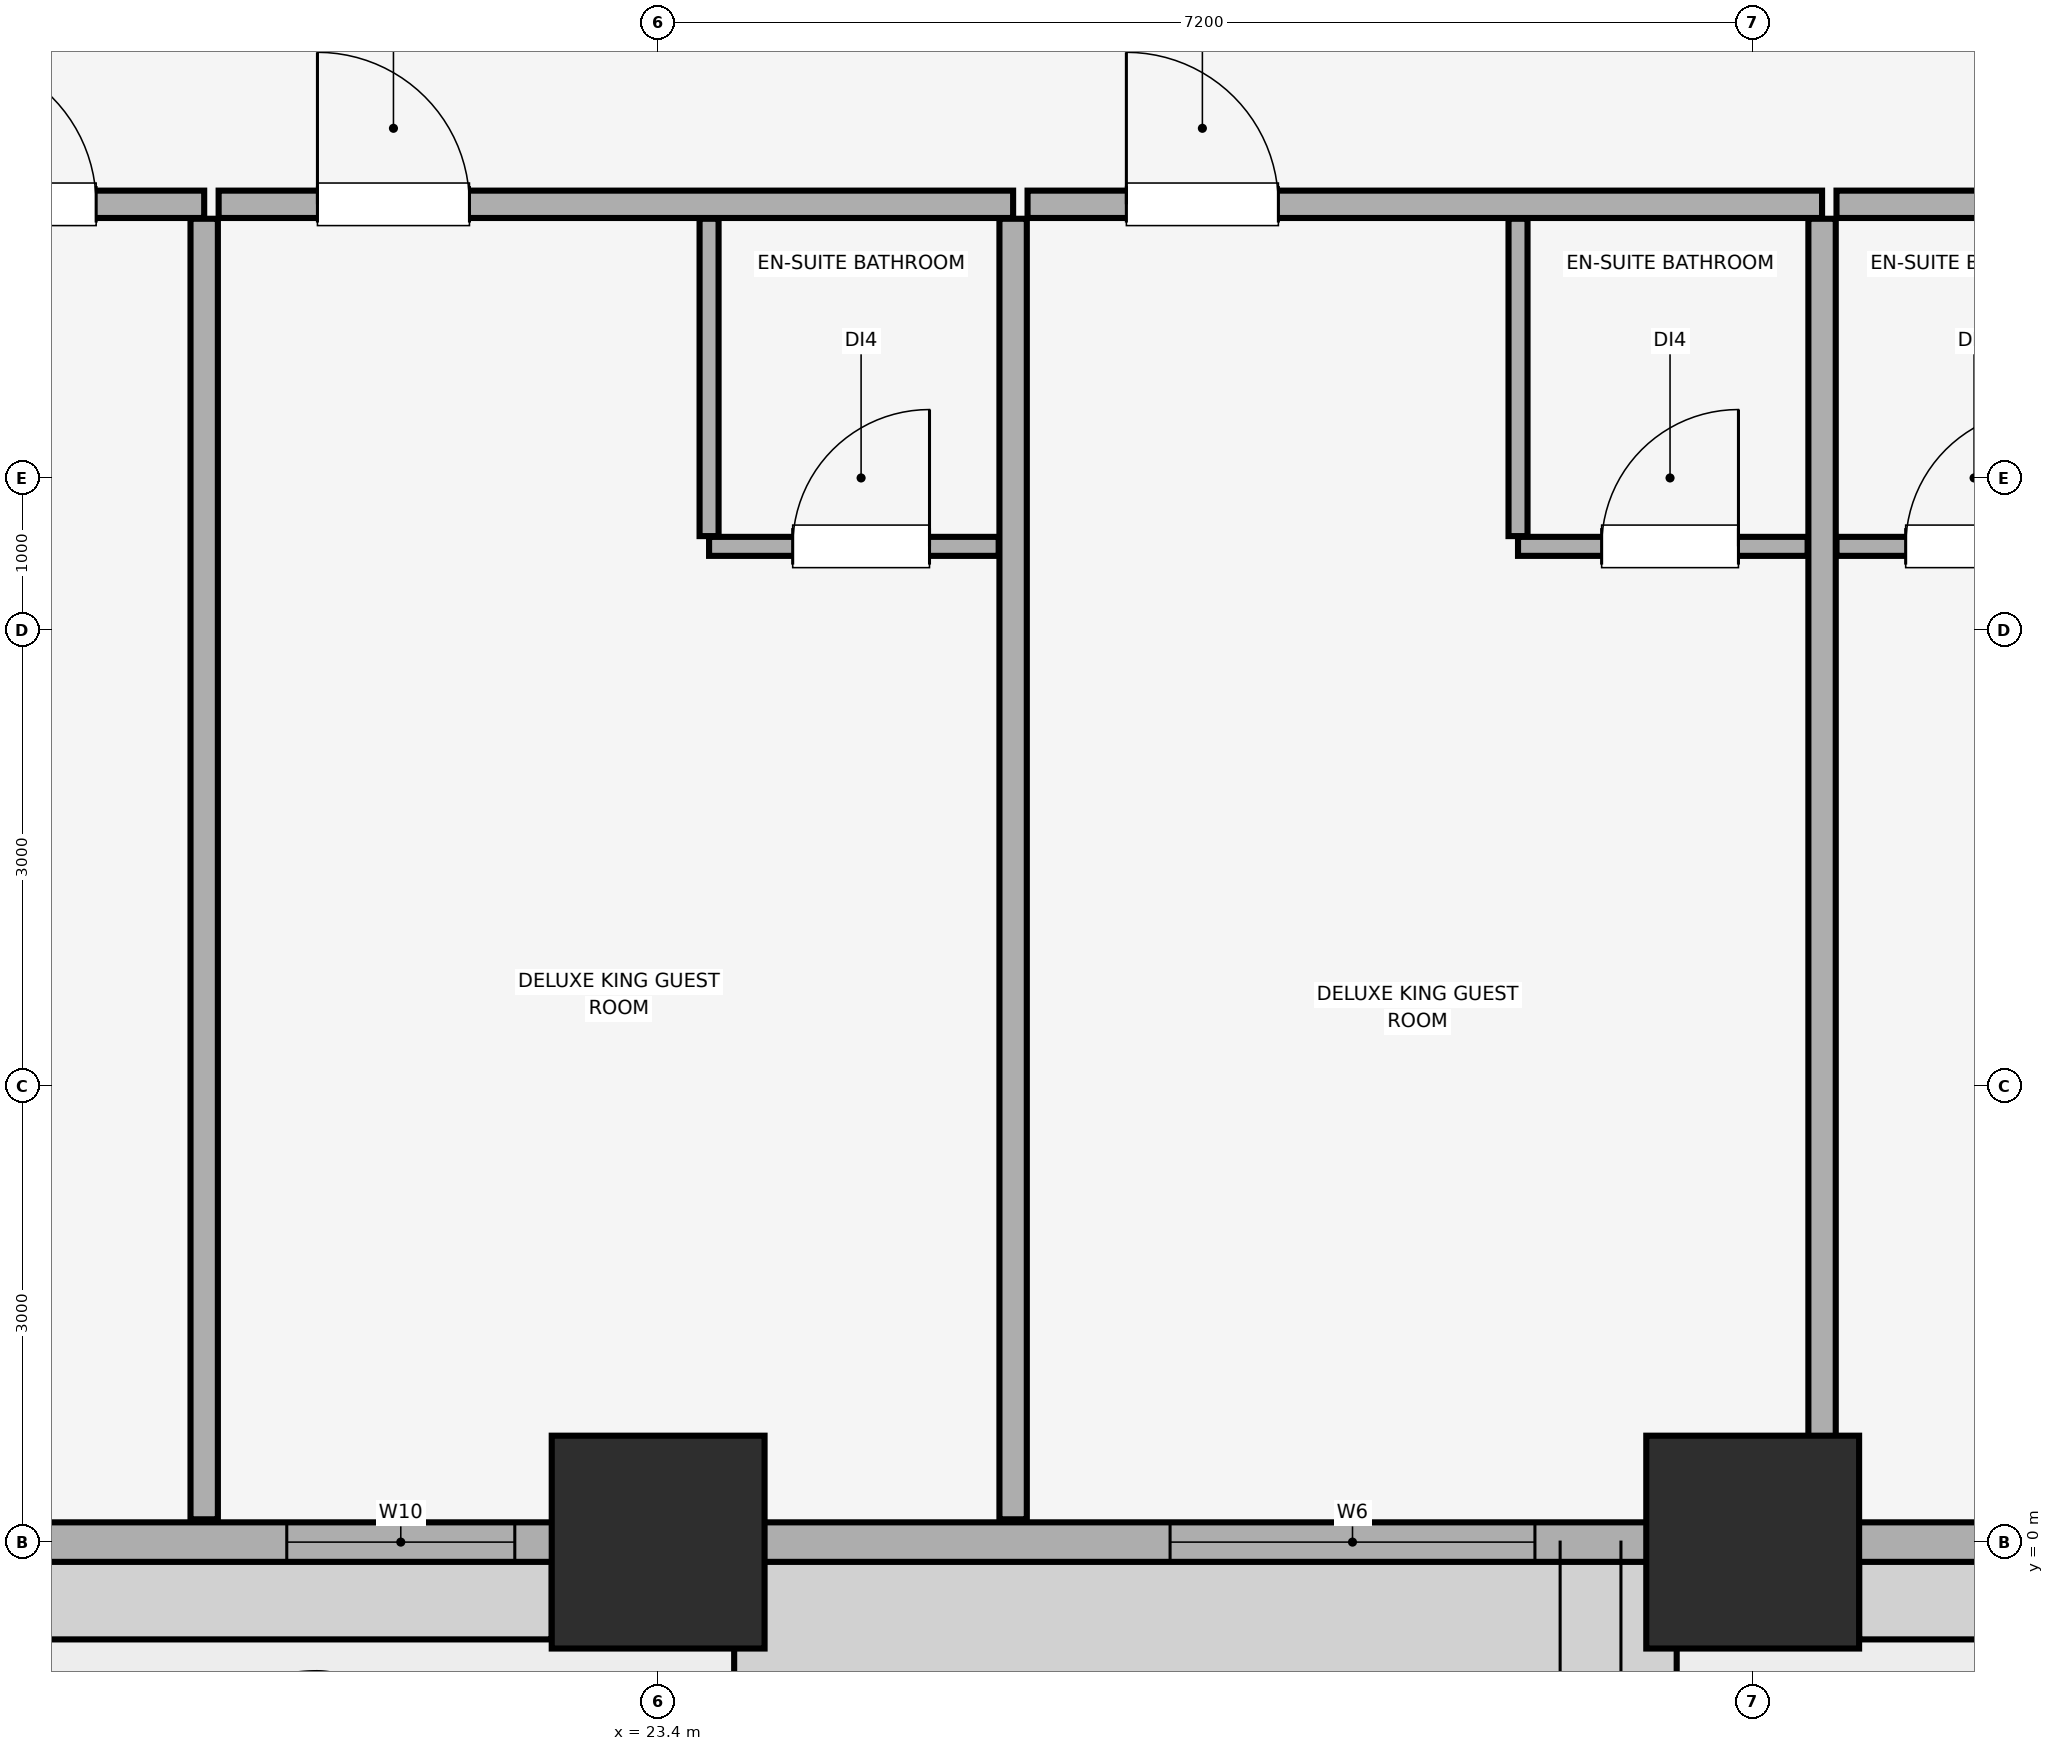
"""IFC4 building model, lengths in metres.
Left out: names, types, materials, properties, quantities, classifications, styles, units other than length and angle.
Written with IfcOpenShell. Run it as: python <this file> out.ifc"""

import sys

from ifc_helpers import new_model, si_unit, direction, frame, frame_2d, origin, origin_2d, place, context, subcontext, project, spatial, rectangle, extrude, element, fill, save


model = new_model("IFC4")
c1 = context("Model", 3, precision=1e-05, world=origin(), true_north=direction((0.0, 1.0)))
c2 = subcontext(c1, "Body", "Model", "MODEL_VIEW")
j1 = project(units=[si_unit("LENGTHUNIT", "METRE"), si_unit("PLANEANGLEUNIT", "RADIAN")], contexts=[c1])
p1 = place(None, origin())
s1 = spatial("IfcSite", under=j1, at=p1, CompositionType="ELEMENT")
p2 = place(p1, origin())
s2 = spatial("IfcBuilding", under=s1, at=p2, CompositionType="ELEMENT")
p3 = place(p2, frame((0.0, 0.0, 31.4)))
s3 = spatial("IfcBuildingStorey", under=s2, at=p3, CompositionType="ELEMENT", Elevation=31.4)
for number, where, z_axis, x_axis in (
    (1, (23.4, 0.0, 0.0), (0.0, 0.0, 1.0), (1.0, 0.0, 0.0)),
    (2, (30.6, 0.0, 0.0), (0.0, 0.0, 1.0), (1.0, 0.0, 0.0)),
):
    element("IfcColumn", number, at=place(p3, frame(where, z_axis=z_axis, x_axis=x_axis)), inside=s3, PredefinedType="COLUMN", context=c2, shape_type="SweptSolid", body=[
        extrude(rectangle(XDim=1.4, YDim=1.4, at=origin_2d()), origin(), (0.0, 0.0, 1.0), 3.51),
    ])
p4 = place(p3, frame((4.2, 0.0, 0.0), z_axis=(0.0, 0.0, 1.0), x_axis=(1.0, 0.0, 0.0)))
e3 = element("IfcWall", 3, at=p4, inside=s3, PredefinedType="SOLIDWALL", context=c2, shape_type="SweptSolid", body=[
    extrude(rectangle(XDim=75.6, YDim=0.26, at=frame_2d((37.8, 0.0))), origin(), (0.0, 0.0, 1.0), 2.56),
])
p5 = place(p4, frame((13.517, 0.0, 0.0)))
e4 = element("IfcOpeningElement", 4, at=p5, cuts=e3, PredefinedType="OPENING", context=c2, shape_type="SweptSolid", body=[
    extrude(rectangle(XDim=1.1, YDim=2.15, at=frame_2d((0.55, 1.075))), frame((0.0, 0.14, 0.0), z_axis=(0.0, -1.0, 0.0), x_axis=(1.0, 0.0, 0.0)), (0.0, 0.0, 1.0), 0.28),
])
p6 = place(p4, frame((28.183, 0.0, 0.0)))
e5 = element("IfcOpeningElement", 5, at=p6, cuts=e3, PredefinedType="OPENING", context=c2, shape_type="SweptSolid", body=[
    extrude(rectangle(XDim=1.1, YDim=2.15, at=frame_2d((0.55, 1.075))), frame((0.0, 0.14, 0.0), z_axis=(0.0, -1.0, 0.0), x_axis=(1.0, 0.0, 0.0)), (0.0, 0.0, 1.0), 0.28),
])
p7 = place(p4, frame((60.983, 0.0, 0.0)))
e6 = element("IfcOpeningElement", 6, at=p7, cuts=e3, PredefinedType="OPENING", context=c2, shape_type="SweptSolid", body=[
    extrude(rectangle(XDim=1.1, YDim=2.15, at=frame_2d((0.55, 1.075))), frame((0.0, 0.14, 0.0), z_axis=(0.0, -1.0, 0.0), x_axis=(1.0, 0.0, 0.0)), (0.0, 0.0, 1.0), 0.28),
])
p8 = place(p4, frame((1.035, 0.0, 0.85)))
e7 = element("IfcOpeningElement", 7, at=p8, cuts=e3, PredefinedType="OPENING", context=c2, shape_type="SweptSolid", body=[
    extrude(rectangle(XDim=2.4, YDim=1.5, at=frame_2d((1.2, 0.75))), frame((0.0, 0.14, 0.0), z_axis=(0.0, -1.0, 0.0), x_axis=(1.0, 0.0, 0.0)), (0.0, 0.0, 1.0), 0.28),
])
p9 = place(p4, frame((7.031, 0.0, 0.85)))
e8 = element("IfcOpeningElement", 8, at=p9, cuts=e3, PredefinedType="OPENING", context=c2, shape_type="SweptSolid", body=[
    extrude(rectangle(XDim=2.4, YDim=1.5, at=frame_2d((1.2, 0.75))), frame((0.0, 0.14, 0.0), z_axis=(0.0, -1.0, 0.0), x_axis=(1.0, 0.0, 0.0)), (0.0, 0.0, 1.0), 0.28),
])
p10 = place(p4, frame((16.757, 0.0, 0.85)))
e9 = element("IfcOpeningElement", 9, at=p10, cuts=e3, PredefinedType="OPENING", context=c2, shape_type="SweptSolid", body=[
    extrude(rectangle(XDim=1.5, YDim=1.4, at=frame_2d((0.75, 0.7))), frame((0.0, 0.14, 0.0), z_axis=(0.0, -1.0, 0.0), x_axis=(1.0, 0.0, 0.0)), (0.0, 0.0, 1.0), 0.28),
])
p11 = place(p4, frame((22.567, 0.0, 0.85)))
e10 = element("IfcOpeningElement", 10, at=p11, cuts=e3, PredefinedType="OPENING", context=c2, shape_type="SweptSolid", body=[
    extrude(rectangle(XDim=2.4, YDim=1.5, at=frame_2d((1.2, 0.75))), frame((0.0, 0.14, 0.0), z_axis=(0.0, -1.0, 0.0), x_axis=(1.0, 0.0, 0.0)), (0.0, 0.0, 1.0), 0.28),
])
p12 = place(p4, frame((30.065, 0.0, 0.85)))
e11 = element("IfcOpeningElement", 11, at=p12, cuts=e3, PredefinedType="OPENING", context=c2, shape_type="SweptSolid", body=[
    extrude(rectangle(XDim=1.5, YDim=1.4, at=frame_2d((0.75, 0.7))), frame((0.0, 0.14, 0.0), z_axis=(0.0, -1.0, 0.0), x_axis=(1.0, 0.0, 0.0)), (0.0, 0.0, 1.0), 0.28),
])
p13 = place(p4, frame((34.55, 0.0, 0.85)))
e12 = element("IfcOpeningElement", 12, at=p13, cuts=e3, PredefinedType="OPENING", context=c2, shape_type="SweptSolid", body=[
    extrude(rectangle(XDim=2.4, YDim=1.5, at=frame_2d((1.2, 0.75))), frame((0.0, 0.14, 0.0), z_axis=(0.0, -1.0, 0.0), x_axis=(1.0, 0.0, 0.0)), (0.0, 0.0, 1.0), 0.28),
])
p14 = place(p4, frame((38.35, 0.0, 0.85)))
e13 = element("IfcOpeningElement", 13, at=p14, cuts=e3, PredefinedType="OPENING", context=c2, shape_type="SweptSolid", body=[
    extrude(rectangle(XDim=2.4, YDim=1.5, at=frame_2d((1.2, 0.75))), frame((0.0, 0.14, 0.0), z_axis=(0.0, -1.0, 0.0), x_axis=(1.0, 0.0, 0.0)), (0.0, 0.0, 1.0), 0.28),
])
p15 = place(p4, frame((44.281, 0.0, 0.85)))
e14 = element("IfcOpeningElement", 14, at=p15, cuts=e3, PredefinedType="OPENING", context=c2, shape_type="SweptSolid", body=[
    extrude(rectangle(XDim=2.4, YDim=1.5, at=frame_2d((1.2, 0.75))), frame((0.0, 0.14, 0.0), z_axis=(0.0, -1.0, 0.0), x_axis=(1.0, 0.0, 0.0)), (0.0, 0.0, 1.0), 0.28),
])
p16 = place(p4, frame((50.332, 0.0, 0.85)))
e15 = element("IfcOpeningElement", 15, at=p16, cuts=e3, PredefinedType="OPENING", context=c2, shape_type="SweptSolid", body=[
    extrude(rectangle(XDim=2.4, YDim=1.5, at=frame_2d((1.2, 0.75))), frame((0.0, 0.14, 0.0), z_axis=(0.0, -1.0, 0.0), x_axis=(1.0, 0.0, 0.0)), (0.0, 0.0, 1.0), 0.28),
])
p17 = place(p4, frame((53.981, 0.0, 0.85)))
e16 = element("IfcOpeningElement", 16, at=p17, cuts=e3, PredefinedType="OPENING", context=c2, shape_type="SweptSolid", body=[
    extrude(rectangle(XDim=1.5, YDim=1.4, at=frame_2d((0.75, 0.7))), frame((0.0, 0.14, 0.0), z_axis=(0.0, -1.0, 0.0), x_axis=(1.0, 0.0, 0.0)), (0.0, 0.0, 1.0), 0.28),
])
p18 = place(p4, frame((64.759, 0.0, 0.85)))
e17 = element("IfcOpeningElement", 17, at=p18, cuts=e3, PredefinedType="OPENING", context=c2, shape_type="SweptSolid", body=[
    extrude(rectangle(XDim=1.5, YDim=1.4, at=frame_2d((0.75, 0.7))), frame((0.0, 0.14, 0.0), z_axis=(0.0, -1.0, 0.0), x_axis=(1.0, 0.0, 0.0)), (0.0, 0.0, 1.0), 0.28),
])
p19 = place(p4, frame((67.509, 0.0, 0.85)))
e18 = element("IfcOpeningElement", 18, at=p19, cuts=e3, PredefinedType="OPENING", context=c2, shape_type="SweptSolid", body=[
    extrude(rectangle(XDim=2.4, YDim=1.5, at=frame_2d((1.2, 0.75))), frame((0.0, 0.14, 0.0), z_axis=(0.0, -1.0, 0.0), x_axis=(1.0, 0.0, 0.0)), (0.0, 0.0, 1.0), 0.28),
])
p20 = place(p4, frame((72.165, 0.0, 0.85)))
e19 = element("IfcOpeningElement", 19, at=p20, cuts=e3, PredefinedType="OPENING", context=c2, shape_type="SweptSolid", body=[
    extrude(rectangle(XDim=2.4, YDim=1.5, at=frame_2d((1.2, 0.75))), frame((0.0, 0.14, 0.0), z_axis=(0.0, -1.0, 0.0), x_axis=(1.0, 0.0, 0.0)), (0.0, 0.0, 1.0), 0.28),
])
p21 = place(p3, frame((15.188, 8.8, 0.0), z_axis=(0.0, 0.0, 1.0), x_axis=(1.0, 0.0, 0.0)))
e20 = element("IfcWall", 20, at=p21, inside=s3, PredefinedType="PARTITIONING", context=c2, shape_type="SweptSolid", body=[
    extrude(rectangle(XDim=5.226, YDim=0.18, at=frame_2d((2.613, 0.0))), origin(), (0.0, 0.0, 1.0), 3.51),
])
p22 = place(p21, frame((3.516, 0.0, 0.0)))
e21 = element("IfcOpeningElement", 21, at=p22, cuts=e20, PredefinedType="OPENING", context=c2, shape_type="SweptSolid", body=[
    extrude(rectangle(XDim=1.0, YDim=2.15, at=frame_2d((0.5, 1.075))), frame((0.0, 0.1, 0.0), z_axis=(0.0, -1.0, 0.0), x_axis=(1.0, 0.0, 0.0)), (0.0, 0.0, 1.0), 0.2),
])
p23 = place(p3, frame((20.414, 0.15, 0.0), z_axis=(0.0, 0.0, 1.0), x_axis=(0.0, 1.0, 0.0)))
e22 = element("IfcWall", 22, at=p23, inside=s3, PredefinedType="PARTITIONING", context=c2, shape_type="SweptSolid", body=[
    extrude(rectangle(XDim=8.555, YDim=0.18, at=frame_2d((4.278, 0.0))), origin(), (0.0, 0.0, 1.0), 3.51),
])
p24 = place(p3, frame((20.509, 8.8, 0.0), z_axis=(0.0, 0.0, 1.0), x_axis=(1.0, 0.0, 0.0)))
e23 = element("IfcWall", 23, at=p24, inside=s3, PredefinedType="PARTITIONING", context=c2, shape_type="SweptSolid", body=[
    extrude(rectangle(XDim=5.226, YDim=0.18, at=frame_2d((2.613, 0.0))), origin(), (0.0, 0.0, 1.0), 3.51),
])
p25 = place(p24, frame((0.65, 0.0, 0.0)))
e24 = element("IfcOpeningElement", 24, at=p25, cuts=e23, PredefinedType="OPENING", context=c2, shape_type="SweptSolid", body=[
    extrude(rectangle(XDim=1.0, YDim=2.15, at=frame_2d((0.5, 1.075))), frame((0.0, 0.1, 0.0), z_axis=(0.0, -1.0, 0.0), x_axis=(1.0, 0.0, 0.0)), (0.0, 0.0, 1.0), 0.2),
])
p26 = place(p3, frame((25.735, 0.15, 0.0), z_axis=(0.0, 0.0, 1.0), x_axis=(0.0, 1.0, 0.0)))
e25 = element("IfcWall", 25, at=p26, inside=s3, PredefinedType="PARTITIONING", context=c2, shape_type="SweptSolid", body=[
    extrude(rectangle(XDim=8.555, YDim=0.18, at=frame_2d((4.278, 0.0))), origin(), (0.0, 0.0, 1.0), 3.51),
])
p27 = place(p3, frame((23.735, 6.55, 0.0), z_axis=(0.0, 0.0, 1.0), x_axis=(1.0, 0.0, 0.0)))
e26 = element("IfcWall", 26, at=p27, inside=s3, PredefinedType="PARTITIONING", context=c2, shape_type="SweptSolid", body=[
    extrude(rectangle(XDim=1.905, YDim=0.125, at=frame_2d((0.952, 0.0))), origin(), (0.0, 0.0, 1.0), 3.51),
])
p28 = place(p27, frame((0.55, 0.0, 0.0)))
e27 = element("IfcOpeningElement", 27, at=p28, cuts=e26, PredefinedType="OPENING", context=c2, shape_type="SweptSolid", body=[
    extrude(rectangle(XDim=0.9, YDim=2.1, at=frame_2d((0.45, 1.05))), frame((0.0, 0.073, 0.0), z_axis=(0.0, -1.0, 0.0), x_axis=(1.0, 0.0, 0.0)), (0.0, 0.0, 1.0), 0.145),
])
p29 = place(p3, frame((23.735, 6.617, 0.0), z_axis=(0.0, 0.0, 1.0), x_axis=(0.0, 1.0, 0.0)))
e28 = element("IfcWall", 28, at=p29, inside=s3, PredefinedType="PARTITIONING", context=c2, shape_type="SweptSolid", body=[
    extrude(rectangle(XDim=2.088, YDim=0.125, at=frame_2d((1.044, 0.0))), origin(), (0.0, 0.0, 1.0), 3.51),
])
p30 = place(p3, frame((25.83, 8.8, 0.0), z_axis=(0.0, 0.0, 1.0), x_axis=(1.0, 0.0, 0.0)))
e29 = element("IfcWall", 29, at=p30, inside=s3, PredefinedType="PARTITIONING", context=c2, shape_type="SweptSolid", body=[
    extrude(rectangle(XDim=5.226, YDim=0.18, at=frame_2d((2.613, 0.0))), origin(), (0.0, 0.0, 1.0), 3.51),
])
p31 = place(p30, frame((0.65, 0.0, 0.0)))
e30 = element("IfcOpeningElement", 30, at=p31, cuts=e29, PredefinedType="OPENING", context=c2, shape_type="SweptSolid", body=[
    extrude(rectangle(XDim=1.0, YDim=2.15, at=frame_2d((0.5, 1.075))), frame((0.0, 0.1, 0.0), z_axis=(0.0, -1.0, 0.0), x_axis=(1.0, 0.0, 0.0)), (0.0, 0.0, 1.0), 0.2),
])
p32 = place(p3, frame((31.056, 0.15, 0.0), z_axis=(0.0, 0.0, 1.0), x_axis=(0.0, 1.0, 0.0)))
e31 = element("IfcWall", 31, at=p32, inside=s3, PredefinedType="PARTITIONING", context=c2, shape_type="SweptSolid", body=[
    extrude(rectangle(XDim=8.555, YDim=0.18, at=frame_2d((4.278, 0.0))), origin(), (0.0, 0.0, 1.0), 2.88),
])
p33 = place(p3, frame((29.056, 6.55, 0.0), z_axis=(0.0, 0.0, 1.0), x_axis=(1.0, 0.0, 0.0)))
e32 = element("IfcWall", 32, at=p33, inside=s3, PredefinedType="PARTITIONING", context=c2, shape_type="SweptSolid", body=[
    extrude(rectangle(XDim=1.905, YDim=0.125, at=frame_2d((0.952, 0.0))), origin(), (0.0, 0.0, 1.0), 3.51),
])
p34 = place(p33, frame((0.55, 0.0, 0.0)))
e33 = element("IfcOpeningElement", 33, at=p34, cuts=e32, PredefinedType="OPENING", context=c2, shape_type="SweptSolid", body=[
    extrude(rectangle(XDim=0.9, YDim=2.1, at=frame_2d((0.45, 1.05))), frame((0.0, 0.073, 0.0), z_axis=(0.0, -1.0, 0.0), x_axis=(1.0, 0.0, 0.0)), (0.0, 0.0, 1.0), 0.145),
])
p35 = place(p3, frame((29.056, 6.617, 0.0), z_axis=(0.0, 0.0, 1.0), x_axis=(0.0, 1.0, 0.0)))
e34 = element("IfcWall", 34, at=p35, inside=s3, PredefinedType="PARTITIONING", context=c2, shape_type="SweptSolid", body=[
    extrude(rectangle(XDim=2.088, YDim=0.125, at=frame_2d((1.044, 0.0))), origin(), (0.0, 0.0, 1.0), 3.51),
])
p36 = place(p3, frame((31.151, 8.8, 0.0), z_axis=(0.0, 0.0, 1.0), x_axis=(1.0, 0.0, 0.0)))
e35 = element("IfcWall", 35, at=p36, inside=s3, PredefinedType="PARTITIONING", context=c2, shape_type="SweptSolid", body=[
    extrude(rectangle(XDim=5.226, YDim=0.18, at=frame_2d((2.613, 0.0))), origin(), (0.0, 0.0, 1.0), 3.51),
])
p37 = place(p36, frame((3.516, 0.0, 0.0)))
e36 = element("IfcOpeningElement", 36, at=p37, cuts=e35, PredefinedType="OPENING", context=c2, shape_type="SweptSolid", body=[
    extrude(rectangle(XDim=1.0, YDim=2.15, at=frame_2d((0.5, 1.075))), frame((0.0, 0.1, 0.0), z_axis=(0.0, -1.0, 0.0), x_axis=(1.0, 0.0, 0.0)), (0.0, 0.0, 1.0), 0.2),
])
p38 = place(p3, frame((31.151, 6.55, 0.0), z_axis=(0.0, 0.0, 1.0), x_axis=(1.0, 0.0, 0.0)))
e37 = element("IfcWall", 37, at=p38, inside=s3, PredefinedType="PARTITIONING", context=c2, shape_type="SweptSolid", body=[
    extrude(rectangle(XDim=1.905, YDim=0.125, at=frame_2d((0.953, 0.0))), origin(), (0.0, 0.0, 1.0), 3.51),
])
p39 = place(p38, frame((0.455, 0.0, 0.0)))
e38 = element("IfcOpeningElement", 38, at=p39, cuts=e37, PredefinedType="OPENING", context=c2, shape_type="SweptSolid", body=[
    extrude(rectangle(XDim=0.9, YDim=2.1, at=frame_2d((0.45, 1.05))), frame((0.0, 0.073, 0.0), z_axis=(0.0, -1.0, 0.0), x_axis=(1.0, 0.0, 0.0)), (0.0, 0.0, 1.0), 0.145),
])
p40 = place(p10, origin())
e39 = element("IfcWindow", 39, at=p40, inside=s3, PartitioningType="SINGLE_PANEL", PredefinedType="WINDOW", context=c2, shape_type="SweptSolid", body=[
    extrude(rectangle(XDim=1.5, YDim=1.4, at=frame_2d((0.75, 0.7))), frame((0.0, 0.03, 0.0), z_axis=(0.0, -1.0, 0.0), x_axis=(1.0, 0.0, 0.0)), (0.0, 0.0, 1.0), 0.06),
])
fill(e9, e39)
p41 = place(p11, origin())
e40 = element("IfcWindow", 40, at=p41, inside=s3, PartitioningType="SINGLE_PANEL", PredefinedType="WINDOW", context=c2, shape_type="SweptSolid", body=[
    extrude(rectangle(XDim=2.4, YDim=1.5, at=frame_2d((1.2, 0.75))), frame((0.0, 0.03, 0.0), z_axis=(0.0, -1.0, 0.0), x_axis=(1.0, 0.0, 0.0)), (0.0, 0.0, 1.0), 0.06),
])
fill(e10, e40)
p42 = place(p22, origin())
e41 = element("IfcDoor", 41, at=p42, inside=s3, OperationType="SINGLE_SWING_LEFT", PredefinedType="DOOR", context=c2, shape_type="SweptSolid", body=[
    extrude(rectangle(XDim=1.0, YDim=2.15, at=frame_2d((0.5, 1.075))), frame((0.0, 0.025, 0.0), z_axis=(0.0, -1.0, 0.0), x_axis=(1.0, 0.0, 0.0)), (0.0, 0.0, 1.0), 0.05),
])
fill(e21, e41)
p43 = place(p25, origin())
e42 = element("IfcDoor", 42, at=p43, inside=s3, OperationType="SINGLE_SWING_LEFT", PredefinedType="DOOR", context=c2, shape_type="SweptSolid", body=[
    extrude(rectangle(XDim=1.0, YDim=2.15, at=frame_2d((0.5, 1.075))), frame((0.0, 0.025, 0.0), z_axis=(0.0, -1.0, 0.0), x_axis=(1.0, 0.0, 0.0)), (0.0, 0.0, 1.0), 0.05),
])
fill(e24, e42)
p44 = place(p28, origin())
e43 = element("IfcDoor", 43, at=p44, inside=s3, OperationType="SINGLE_SWING_RIGHT", PredefinedType="DOOR", context=c2, shape_type="SweptSolid", body=[
    extrude(rectangle(XDim=0.9, YDim=2.1, at=frame_2d((0.45, 1.05))), frame((0.0, 0.025, 0.0), z_axis=(0.0, -1.0, 0.0), x_axis=(1.0, 0.0, 0.0)), (0.0, 0.0, 1.0), 0.05),
])
fill(e27, e43)
p45 = place(p31, origin())
e44 = element("IfcDoor", 44, at=p45, inside=s3, OperationType="SINGLE_SWING_LEFT", PredefinedType="DOOR", context=c2, shape_type="SweptSolid", body=[
    extrude(rectangle(XDim=1.0, YDim=2.15, at=frame_2d((0.5, 1.075))), frame((0.0, 0.025, 0.0), z_axis=(0.0, -1.0, 0.0), x_axis=(1.0, 0.0, 0.0)), (0.0, 0.0, 1.0), 0.05),
])
fill(e30, e44)
p46 = place(p34, origin())
e45 = element("IfcDoor", 45, at=p46, inside=s3, OperationType="SINGLE_SWING_RIGHT", PredefinedType="DOOR", context=c2, shape_type="SweptSolid", body=[
    extrude(rectangle(XDim=0.9, YDim=2.1, at=frame_2d((0.45, 1.05))), frame((0.0, 0.025, 0.0), z_axis=(0.0, -1.0, 0.0), x_axis=(1.0, 0.0, 0.0)), (0.0, 0.0, 1.0), 0.05),
])
fill(e33, e45)
p47 = place(p39, origin())
e46 = element("IfcDoor", 46, at=p47, inside=s3, OperationType="SINGLE_SWING_RIGHT", PredefinedType="DOOR", context=c2, shape_type="SweptSolid", body=[
    extrude(rectangle(XDim=0.9, YDim=2.1, at=frame_2d((0.45, 1.05))), frame((0.0, 0.025, 0.0), z_axis=(0.0, -1.0, 0.0), x_axis=(1.0, 0.0, 0.0)), (0.0, 0.0, 1.0), 0.05),
])
fill(e38, e46)
save(model, sys.argv[1])
